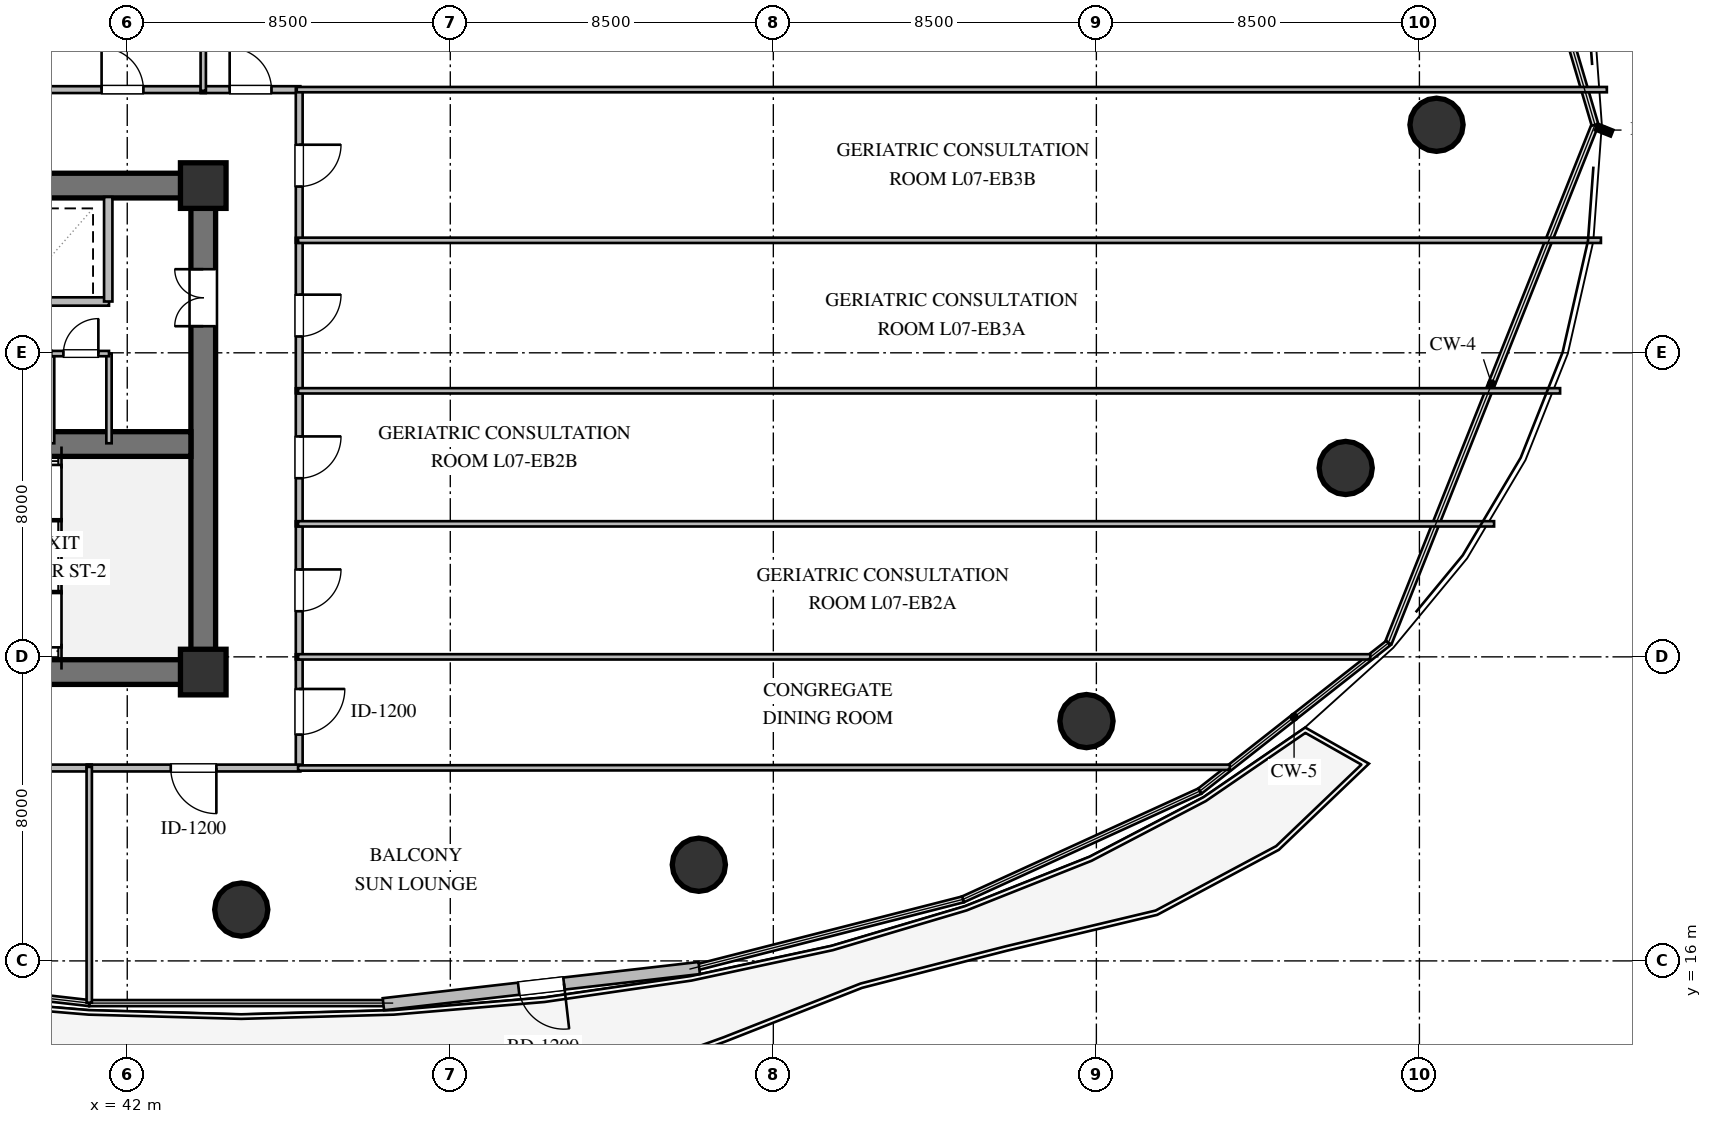
"""IFC4 building model, lengths in metres.
Left out: names, types, materials, properties, quantities, classifications, styles, units other than length and angle.
Written with IfcOpenShell. Run it as: python <this file> out.ifc"""

import sys

from ifc_helpers import new_model, si_unit, direction, frame, frame_2d, origin, origin_2d, place, context, subcontext, project, spatial, rectangle, circle, extrude, element, fill, save


model = new_model("IFC4")
c1 = context("Model", 3, precision=1e-05, world=origin(), true_north=direction((0.0, 1.0)))
c2 = subcontext(c1, "Body", "Model", "MODEL_VIEW")
j1 = project(units=[si_unit("LENGTHUNIT", "METRE"), si_unit("PLANEANGLEUNIT", "RADIAN")], contexts=[c1])
p1 = place(None, origin())
s1 = spatial("IfcSite", under=j1, at=p1, CompositionType="ELEMENT")
p2 = place(p1, origin())
s2 = spatial("IfcBuilding", under=s1, at=p2, CompositionType="ELEMENT")
p3 = place(p2, frame((0.0, 0.0, 31.2)))
s3 = spatial("IfcBuildingStorey", under=s2, at=p3, CompositionType="ELEMENT", Elevation=31.2)
for number, where, z_axis, x_axis in (
    (1, (21.675, 23.6, 0.0), (0.0, 0.0, 1.0), (1.0, 0.0, 0.0)),
    (2, (21.675, 36.4, 0.0), (0.0, 0.0, 1.0), (1.0, 0.0, 0.0)),
):
    element("IfcWall", number, at=place(p3, frame(where, z_axis=z_axis, x_axis=x_axis)), inside=s3, PredefinedType="SHEAR", context=c2, shape_type="SweptSolid", body=[
        extrude(rectangle(XDim=22.65, YDim=0.65, at=frame_2d((11.325, 0.0))), origin(), (0.0, 0.0, 1.0), 3.36),
    ])
p4 = place(p3, frame((44.0, 23.925, 0.0), z_axis=(0.0, 0.0, 1.0), x_axis=(0.0, 1.0, 0.0)))
e3 = element("IfcWall", 3, at=p4, inside=s3, PredefinedType="SHEAR", context=c2, shape_type="SweptSolid", body=[
    extrude(rectangle(XDim=12.15, YDim=0.65, at=frame_2d((6.075, 0.0))), origin(), (0.0, 0.0, 1.0), 3.36),
])
p5 = place(p4, frame((8.775, 0.0, 0.0)))
e4 = element("IfcOpeningElement", 4, at=p5, cuts=e3, PredefinedType="OPENING", context=c2, shape_type="SweptSolid", body=[
    extrude(rectangle(XDim=1.5, YDim=2.15, at=frame_2d((0.75, 1.075))), frame((0.0, 0.335, 0.0), z_axis=(0.0, -1.0, 0.0), x_axis=(1.0, 0.0, 0.0)), (0.0, 0.0, 1.0), 0.67),
])
p6 = place(p3, frame((22.325, 29.6, 0.0), z_axis=(0.0, 0.0, 1.0), x_axis=(1.0, 0.0, 0.0)))
e5 = element("IfcWall", 5, at=p6, inside=s3, PredefinedType="SHEAR", context=c2, shape_type="SweptSolid", body=[
    extrude(rectangle(XDim=21.35, YDim=0.65, at=frame_2d((10.675, 0.0))), origin(), (0.0, 0.0, 1.0), 3.36),
])
p7 = place(p6, frame((12.125, 0.0, 0.0)))
e6 = element("IfcOpeningElement", 6, at=p7, cuts=e5, PredefinedType="OPENING", context=c2, shape_type="SweptSolid", body=[
    extrude(rectangle(XDim=1.15, YDim=2.1, at=frame_2d((0.575, 1.05))), frame((0.0, 0.335, 0.0), z_axis=(0.0, -1.0, 0.0), x_axis=(1.0, 0.0, 0.0)), (0.0, 0.0, 1.0), 0.67),
])
for number, where, z_axis, x_axis in (
    (7, (44.0, 23.6, 0.0), (0.0, 0.0, 1.0), (1.0, 0.0, 0.0)),
    (8, (44.0, 36.4, 0.0), (0.0, 0.0, 1.0), (1.0, 0.0, 0.0)),
):
    element("IfcColumn", number, at=place(p3, frame(where, z_axis=z_axis, x_axis=x_axis)), inside=s3, PredefinedType="COLUMN", context=c2, shape_type="SweptSolid", body=[
        extrude(rectangle(XDim=1.2, YDim=1.2, at=origin_2d()), origin(), (0.0, 0.0, 1.0), 3.6),
    ])
for number, where, z_axis, x_axis in (
    (9, (76.45, 38.0, 0.0), (0.0, 0.0, 1.0), (1.0, 0.0, 0.0)),
    (10, (45.0, 17.35, 0.0), (0.0, 0.0, 1.0), (1.0, 0.0, 0.0)),
    (11, (57.04, 18.53, 0.0), (0.0, 0.0, 1.0), (1.0, 0.0, 0.0)),
    (12, (67.24, 22.31, 0.0), (0.0, 0.0, 1.0), (1.0, 0.0, 0.0)),
    (13, (74.06, 28.97, 0.0), (0.0, 0.0, 1.0), (1.0, 0.0, 0.0)),
):
    element("IfcColumn", number, at=place(p3, frame(where, z_axis=z_axis, x_axis=x_axis)), inside=s3, PredefinedType="COLUMN", context=c2, shape_type="SweptSolid", body=[
        extrude(circle(Radius=0.7, at=origin_2d()), origin(), (0.0, 0.0, 1.0), 3.6),
    ])
p8 = place(p3, frame((57.05, 15.812, 0.0), z_axis=(0.0, 0.0, 1.0), x_axis=(-0.993503192468, -0.113804246649, 0.0)))
e14 = element("IfcWall", 14, at=p8, inside=s3, PredefinedType="STANDARD", context=c2, shape_type="SweptSolid", body=[
    extrude(rectangle(XDim=8.365, YDim=0.32, at=frame_2d((4.182, 0.0))), origin(), (0.0, 0.0, 1.0), 3.36),
])
p9 = place(p8, frame((3.582, 0.0, 0.0)))
e15 = element("IfcOpeningElement", 15, at=p9, cuts=e14, PredefinedType="OPENING", context=c2, shape_type="SweptSolid", body=[
    extrude(rectangle(XDim=1.2, YDim=2.15, at=frame_2d((0.6, 1.075))), frame((0.0, 0.17, 0.0), z_axis=(0.0, -1.0, 0.0), x_axis=(1.0, 0.0, 0.0)), (0.0, 0.0, 1.0), 0.34),
])
p10 = place(p3, frame((33.98, 33.35, 0.0), z_axis=(0.0, 0.0, 1.0), x_axis=(1.0, 0.0, 0.0)))
e16 = element("IfcWall", 16, at=p10, inside=s3, PredefinedType="SOLIDWALL", context=c2, shape_type="SweptSolid", body=[
    extrude(rectangle(XDim=7.54, YDim=0.22, at=frame_2d((3.77, 0.0))), origin(), (0.0, 0.0, 1.0), 3.36),
])
p11 = place(p3, frame((41.5, 33.35, 0.0), z_axis=(0.0, 0.0, 1.0), x_axis=(0.0, 1.0, 0.0)))
e17 = element("IfcWall", 17, at=p11, inside=s3, PredefinedType="SOLIDWALL", context=c2, shape_type="SweptSolid", body=[
    extrude(rectangle(XDim=2.75, YDim=0.22, at=frame_2d((1.375, 0.0))), origin(), (0.0, 0.0, 1.0), 3.36),
])
p12 = place(p3, frame((40.0, 29.62, 0.0), z_axis=(0.0, 0.0, 1.0), x_axis=(0.0, 1.0, 0.0)))
e18 = element("IfcWall", 18, at=p12, inside=s3, PredefinedType="PLUMBINGWALL", context=c2, shape_type="SweptSolid", body=[
    extrude(rectangle(XDim=2.36, YDim=0.16, at=frame_2d((1.18, 0.0))), origin(), (0.0, 0.0, 1.0), 3.36),
])
p13 = place(p3, frame((41.52, 29.62, 0.0), z_axis=(0.0, 0.0, 1.0), x_axis=(0.0, 1.0, 0.0)))
e19 = element("IfcWall", 19, at=p13, inside=s3, PredefinedType="PARTITIONING", context=c2, shape_type="SweptSolid", body=[
    extrude(rectangle(XDim=2.36, YDim=0.14, at=frame_2d((1.18, 0.0))), origin(), (0.0, 0.0, 1.0), 3.36),
])
p14 = place(p3, frame((40.0, 31.98, 0.0), z_axis=(0.0, 0.0, 1.0), x_axis=(1.0, 0.0, 0.0)))
e20 = element("IfcWall", 20, at=p14, inside=s3, PredefinedType="PARTITIONING", context=c2, shape_type="SweptSolid", body=[
    extrude(rectangle(XDim=1.52, YDim=0.14, at=frame_2d((0.76, 0.0))), origin(), (0.0, 0.0, 1.0), 3.36),
])
p15 = place(p14, frame((0.32, 0.0, 0.0)))
e21 = element("IfcOpeningElement", 21, at=p15, cuts=e20, PredefinedType="OPENING", context=c2, shape_type="SweptSolid", body=[
    extrude(rectangle(XDim=0.92, YDim=2.1, at=frame_2d((0.46, 1.05))), frame((0.0, 0.08, 0.0), z_axis=(0.0, -1.0, 0.0), x_axis=(1.0, 0.0, 0.0)), (0.0, 0.0, 1.0), 0.16),
])
p16 = place(p3, frame((39.685, 38.925, 0.0), z_axis=(0.0, 0.0, 1.0), x_axis=(1.0, 0.0, 0.0)))
e22 = element("IfcWall", 22, at=p16, inside=s3, PredefinedType="PARTITIONING", context=c2, shape_type="SweptSolid", body=[
    extrude(rectangle(XDim=4.38, YDim=0.18, at=frame_2d((2.19, 0.0))), origin(), (0.0, 0.0, 1.0), 3.36),
])
p17 = place(p16, frame((1.64, 0.0, 0.0)))
e23 = element("IfcOpeningElement", 23, at=p17, cuts=e22, PredefinedType="OPENING", context=c2, shape_type="SweptSolid", body=[
    extrude(rectangle(XDim=1.1, YDim=2.1, at=frame_2d((0.55, 1.05))), frame((0.0, 0.1, 0.0), z_axis=(0.0, -1.0, 0.0), x_axis=(1.0, 0.0, 0.0)), (0.0, 0.0, 1.0), 0.2),
])
p18 = place(p3, frame((43.935, 38.925, 0.0), z_axis=(0.0, 0.0, 1.0), x_axis=(1.0, 0.0, 0.0)))
e24 = element("IfcWall", 24, at=p18, inside=s3, PredefinedType="PARTITIONING", context=c2, shape_type="SweptSolid", body=[
    extrude(rectangle(XDim=2.62, YDim=0.18, at=frame_2d((1.31, 0.0))), origin(), (0.0, 0.0, 1.0), 3.36),
])
p19 = place(p18, frame((0.76, 0.0, 0.0)))
e25 = element("IfcOpeningElement", 25, at=p19, cuts=e24, PredefinedType="OPENING", context=c2, shape_type="SweptSolid", body=[
    extrude(rectangle(XDim=1.1, YDim=2.1, at=frame_2d((0.55, 1.05))), frame((0.0, 0.1, 0.0), z_axis=(0.0, -1.0, 0.0), x_axis=(1.0, 0.0, 0.0)), (0.0, 0.0, 1.0), 0.2),
])
p20 = place(p3, frame((46.525, 24.065, 0.0), z_axis=(0.0, 0.0, 1.0), x_axis=(0.0, -1.0, 0.0)))
e26 = element("IfcWall", 26, at=p20, inside=s3, PredefinedType="PARTITIONING", context=c2, shape_type="SweptSolid", body=[
    extrude(rectangle(XDim=3.02, YDim=0.18, at=frame_2d((1.51, 0.0))), origin(), (0.0, 0.0, 1.0), 3.36),
])
p21 = place(p20, frame((0.91, 0.0, 0.0)))
e27 = element("IfcOpeningElement", 27, at=p21, cuts=e26, PredefinedType="OPENING", context=c2, shape_type="SweptSolid", body=[
    extrude(rectangle(XDim=1.2, YDim=2.15, at=frame_2d((0.6, 1.075))), frame((0.0, 0.1, 0.0), z_axis=(0.0, -1.0, 0.0), x_axis=(1.0, 0.0, 0.0)), (0.0, 0.0, 1.0), 0.2),
])
p22 = place(p3, frame((46.525, 27.565, 0.0), z_axis=(0.0, 0.0, 1.0), x_axis=(0.0, -1.0, 0.0)))
e28 = element("IfcWall", 28, at=p22, inside=s3, PredefinedType="PARTITIONING", context=c2, shape_type="SweptSolid", body=[
    extrude(rectangle(XDim=3.63, YDim=0.18, at=frame_2d((1.815, 0.0))), origin(), (0.0, 0.0, 1.0), 3.36),
])
p23 = place(p22, frame((1.265, 0.0, 0.0)))
e29 = element("IfcOpeningElement", 29, at=p23, cuts=e28, PredefinedType="OPENING", context=c2, shape_type="SweptSolid", body=[
    extrude(rectangle(XDim=1.1, YDim=2.1, at=frame_2d((0.55, 1.05))), frame((0.0, 0.1, 0.0), z_axis=(0.0, -1.0, 0.0), x_axis=(1.0, 0.0, 0.0)), (0.0, 0.0, 1.0), 0.2),
])
p24 = place(p3, frame((46.525, 31.065, 0.0), z_axis=(0.0, 0.0, 1.0), x_axis=(0.0, -1.0, 0.0)))
e30 = element("IfcWall", 30, at=p24, inside=s3, PredefinedType="PARTITIONING", context=c2, shape_type="SweptSolid", body=[
    extrude(rectangle(XDim=3.63, YDim=0.18, at=frame_2d((1.815, 0.0))), origin(), (0.0, 0.0, 1.0), 3.36),
])
p25 = place(p24, frame((1.265, 0.0, 0.0)))
e31 = element("IfcOpeningElement", 31, at=p25, cuts=e30, PredefinedType="OPENING", context=c2, shape_type="SweptSolid", body=[
    extrude(rectangle(XDim=1.1, YDim=2.1, at=frame_2d((0.55, 1.05))), frame((0.0, 0.1, 0.0), z_axis=(0.0, -1.0, 0.0), x_axis=(1.0, 0.0, 0.0)), (0.0, 0.0, 1.0), 0.2),
])
p26 = place(p3, frame((46.525, 35.025, 0.0), z_axis=(0.0, 0.0, 1.0), x_axis=(0.0, -1.0, 0.0)))
e32 = element("IfcWall", 32, at=p26, inside=s3, PredefinedType="PARTITIONING", context=c2, shape_type="SweptSolid", body=[
    extrude(rectangle(XDim=4.09, YDim=0.18, at=frame_2d((2.045, 0.0))), origin(), (0.0, 0.0, 1.0), 3.36),
])
p27 = place(p26, frame((1.495, 0.0, 0.0)))
e33 = element("IfcOpeningElement", 33, at=p27, cuts=e32, PredefinedType="OPENING", context=c2, shape_type="SweptSolid", body=[
    extrude(rectangle(XDim=1.1, YDim=2.1, at=frame_2d((0.55, 1.05))), frame((0.0, 0.1, 0.0), z_axis=(0.0, -1.0, 0.0), x_axis=(1.0, 0.0, 0.0)), (0.0, 0.0, 1.0), 0.2),
])
p28 = place(p3, frame((46.525, 38.955, 0.0), z_axis=(0.0, 0.0, 1.0), x_axis=(0.0, -1.0, 0.0)))
e34 = element("IfcWall", 34, at=p28, inside=s3, PredefinedType="PARTITIONING", context=c2, shape_type="SweptSolid", body=[
    extrude(rectangle(XDim=4.06, YDim=0.18, at=frame_2d((2.03, 0.0))), origin(), (0.0, 0.0, 1.0), 3.36),
])
p29 = place(p28, frame((1.48, 0.0, 0.0)))
e35 = element("IfcOpeningElement", 35, at=p29, cuts=e34, PredefinedType="OPENING", context=c2, shape_type="SweptSolid", body=[
    extrude(rectangle(XDim=1.1, YDim=2.1, at=frame_2d((0.55, 1.05))), frame((0.0, 0.1, 0.0), z_axis=(0.0, -1.0, 0.0), x_axis=(1.0, 0.0, 0.0)), (0.0, 0.0, 1.0), 0.2),
])
p30 = place(p3, frame((41.065, 21.075, 0.0), z_axis=(0.0, 0.0, 1.0), x_axis=(-1.0, 0.0, 0.0)))
e36 = element("IfcWall", 36, at=p30, inside=s3, PredefinedType="PARTITIONING", context=c2, shape_type="SweptSolid", body=[
    extrude(rectangle(XDim=7.13, YDim=0.18, at=frame_2d((3.565, 0.0))), origin(), (0.0, 0.0, 1.0), 2.996),
])
p31 = place(p30, frame((3.015, 0.0, 0.0)))
e37 = element("IfcOpeningElement", 37, at=p31, cuts=e36, PredefinedType="OPENING", context=c2, shape_type="SweptSolid", body=[
    extrude(rectangle(XDim=1.1, YDim=2.1, at=frame_2d((0.55, 1.05))), frame((0.0, 0.1, 0.0), z_axis=(0.0, -1.0, 0.0), x_axis=(1.0, 0.0, 0.0)), (0.0, 0.0, 1.0), 0.2),
])
p32 = place(p3, frame((46.555, 21.075, 0.0), z_axis=(0.0, 0.0, 1.0), x_axis=(-1.0, 0.0, 0.0)))
e38 = element("IfcWall", 38, at=p32, inside=s3, PredefinedType="PARTITIONING", context=c2, shape_type="SweptSolid", body=[
    extrude(rectangle(XDim=5.62, YDim=0.18, at=frame_2d((2.81, 0.0))), origin(), (0.0, 0.0, 1.0), 3.36),
])
p33 = place(p32, frame((2.21, 0.0, 0.0)))
e39 = element("IfcOpeningElement", 39, at=p33, cuts=e38, PredefinedType="OPENING", context=c2, shape_type="SweptSolid", body=[
    extrude(rectangle(XDim=1.2, YDim=2.15, at=frame_2d((0.6, 1.075))), frame((0.0, 0.1, 0.0), z_axis=(0.0, -1.0, 0.0), x_axis=(1.0, 0.0, 0.0)), (0.0, 0.0, 1.0), 0.2),
])
p34 = place(p3, frame((44.0, 67.706, 0.0), z_axis=(0.0, 0.0, 1.0), x_axis=(0.0, -1.0, 0.0)))
e40 = element("IfcWall", 40, at=p34, inside=s3, PredefinedType="PARTITIONING", context=c2, shape_type="SweptSolid", body=[
    extrude(rectangle(XDim=28.811, YDim=0.14, at=frame_2d((14.406, 0.0))), origin(), (0.0, 0.0, 1.0), 2.89),
])
p35 = place(p3, frame((80.932, 38.925, 0.0), z_axis=(0.0, 0.0, 1.0), x_axis=(-1.0, 0.0, 0.0)))
e41 = element("IfcWall", 41, at=p35, inside=s3, PredefinedType="PARTITIONING", context=c2, shape_type="SweptSolid", body=[
    extrude(rectangle(XDim=34.472, YDim=0.14, at=frame_2d((17.236, 0.0))), origin(), (0.0, 0.0, 1.0), 3.36),
])
p36 = place(p3, frame((46.495, 24.0, 0.0), z_axis=(0.0, 0.0, 1.0), x_axis=(1.0, 0.0, 0.0)))
e42 = element("IfcWall", 42, at=p36, inside=s3, PredefinedType="PARTITIONING", context=c2, shape_type="SweptSolid", body=[
    extrude(rectangle(XDim=28.214, YDim=0.14, at=frame_2d((14.107, 0.0))), origin(), (0.0, 0.0, 1.0), 2.89),
])
p37 = place(p3, frame((71.011, 21.094, 0.0), z_axis=(0.0, 0.0, 1.0), x_axis=(-0.999999682646, -0.000796685534, 0.0)))
e43 = element("IfcWall", 43, at=p37, inside=s3, PredefinedType="PARTITIONING", context=c2, shape_type="SweptSolid", body=[
    extrude(rectangle(XDim=24.516, YDim=0.14, at=frame_2d((12.258, 0.0))), origin(), (0.0, 0.0, 1.0), 2.996),
])
p38 = place(p3, frame((46.495, 27.5, 0.0), z_axis=(0.0, 0.0, 1.0), x_axis=(1.0, 0.0, 0.0)))
e44 = element("IfcWall", 44, at=p38, inside=s3, PredefinedType="PARTITIONING", context=c2, shape_type="SweptSolid", body=[
    extrude(rectangle(XDim=31.47, YDim=0.14, at=frame_2d((15.735, 0.0))), origin(), (0.0, 0.0, 1.0), 2.89),
])
p39 = place(p3, frame((46.495, 31.0, 0.0), z_axis=(0.0, 0.0, 1.0), x_axis=(1.0, 0.0, 0.0)))
e45 = element("IfcWall", 45, at=p39, inside=s3, PredefinedType="PARTITIONING", context=c2, shape_type="SweptSolid", body=[
    extrude(rectangle(XDim=33.207, YDim=0.14, at=frame_2d((16.604, 0.0))), origin(), (0.0, 0.0, 1.0), 3.36),
])
p40 = place(p3, frame((46.495, 34.96, 0.0), z_axis=(0.0, 0.0, 1.0), x_axis=(1.0, 0.0, 0.0)))
e46 = element("IfcWall", 46, at=p40, inside=s3, PredefinedType="PARTITIONING", context=c2, shape_type="SweptSolid", body=[
    extrude(rectangle(XDim=34.281, YDim=0.14, at=frame_2d((17.14, 0.0))), origin(), (0.0, 0.0, 1.0), 3.36),
])
p41 = place(p3, frame((41.0, 21.105, 0.0), z_axis=(0.0, 0.0, 1.0), x_axis=(0.0, -1.0, 0.0)))
e47 = element("IfcWall", 47, at=p41, inside=s3, PredefinedType="PARTITIONING", context=c2, shape_type="SweptSolid", body=[
    extrude(rectangle(XDim=6.205, YDim=0.14, at=frame_2d((3.103, 0.0))), origin(), (0.0, 0.0, 1.0), 3.36),
])
p42 = place(p9, origin())
e48 = element("IfcDoor", 48, at=p42, inside=s3, OperationType="SINGLE_SWING_LEFT", PredefinedType="DOOR", context=c2, shape_type="SweptSolid", body=[
    extrude(rectangle(XDim=1.2, YDim=2.15, at=frame_2d((0.6, 1.075))), frame((0.0, 0.025, 0.0), z_axis=(0.0, -1.0, 0.0), x_axis=(1.0, 0.0, 0.0)), (0.0, 0.0, 1.0), 0.05),
])
fill(e15, e48)
p43 = place(p5, origin())
e49 = element("IfcDoor", 49, at=p43, inside=s3, OperationType="DOUBLE_DOOR_SINGLE_SWING", PredefinedType="DOOR", context=c2, shape_type="SweptSolid", body=[
    extrude(rectangle(XDim=1.5, YDim=2.15, at=frame_2d((0.75, 1.075))), frame((0.0, 0.025, 0.0), z_axis=(0.0, -1.0, 0.0), x_axis=(1.0, 0.0, 0.0)), (0.0, 0.0, 1.0), 0.05),
])
fill(e4, e49)
p44 = place(p15, origin())
e50 = element("IfcDoor", 50, at=p44, inside=s3, OperationType="SINGLE_SWING_RIGHT", PredefinedType="DOOR", context=c2, shape_type="SweptSolid", body=[
    extrude(rectangle(XDim=0.92, YDim=2.1, at=frame_2d((0.46, 1.05))), frame((0.0, 0.025, 0.0), z_axis=(0.0, -1.0, 0.0), x_axis=(1.0, 0.0, 0.0)), (0.0, 0.0, 1.0), 0.05),
])
fill(e21, e50)
p45 = place(p17, origin())
e51 = element("IfcDoor", 51, at=p45, inside=s3, OperationType="SINGLE_SWING_LEFT", PredefinedType="DOOR", context=c2, shape_type="SweptSolid", body=[
    extrude(rectangle(XDim=1.1, YDim=2.1, at=frame_2d((0.55, 1.05))), frame((0.0, 0.025, 0.0), z_axis=(0.0, -1.0, 0.0), x_axis=(1.0, 0.0, 0.0)), (0.0, 0.0, 1.0), 0.05),
])
fill(e23, e51)
p46 = place(p19, origin())
e52 = element("IfcDoor", 52, at=p46, inside=s3, OperationType="SINGLE_SWING_LEFT", PredefinedType="DOOR", context=c2, shape_type="SweptSolid", body=[
    extrude(rectangle(XDim=1.1, YDim=2.1, at=frame_2d((0.55, 1.05))), frame((0.0, 0.025, 0.0), z_axis=(0.0, -1.0, 0.0), x_axis=(1.0, 0.0, 0.0)), (0.0, 0.0, 1.0), 0.05),
])
fill(e25, e52)
p47 = place(p21, origin())
e53 = element("IfcDoor", 53, at=p47, inside=s3, OperationType="SINGLE_SWING_LEFT", PredefinedType="DOOR", context=c2, shape_type="SweptSolid", body=[
    extrude(rectangle(XDim=1.2, YDim=2.15, at=frame_2d((0.6, 1.075))), frame((0.0, 0.025, 0.0), z_axis=(0.0, -1.0, 0.0), x_axis=(1.0, 0.0, 0.0)), (0.0, 0.0, 1.0), 0.05),
])
fill(e27, e53)
p48 = place(p23, origin())
e54 = element("IfcDoor", 54, at=p48, inside=s3, OperationType="SINGLE_SWING_LEFT", PredefinedType="DOOR", context=c2, shape_type="SweptSolid", body=[
    extrude(rectangle(XDim=1.1, YDim=2.1, at=frame_2d((0.55, 1.05))), frame((0.0, 0.025, 0.0), z_axis=(0.0, -1.0, 0.0), x_axis=(1.0, 0.0, 0.0)), (0.0, 0.0, 1.0), 0.05),
])
fill(e29, e54)
p49 = place(p25, origin())
e55 = element("IfcDoor", 55, at=p49, inside=s3, OperationType="SINGLE_SWING_LEFT", PredefinedType="DOOR", context=c2, shape_type="SweptSolid", body=[
    extrude(rectangle(XDim=1.1, YDim=2.1, at=frame_2d((0.55, 1.05))), frame((0.0, 0.025, 0.0), z_axis=(0.0, -1.0, 0.0), x_axis=(1.0, 0.0, 0.0)), (0.0, 0.0, 1.0), 0.05),
])
fill(e31, e55)
p50 = place(p27, origin())
e56 = element("IfcDoor", 56, at=p50, inside=s3, OperationType="SINGLE_SWING_LEFT", PredefinedType="DOOR", context=c2, shape_type="SweptSolid", body=[
    extrude(rectangle(XDim=1.1, YDim=2.1, at=frame_2d((0.55, 1.05))), frame((0.0, 0.025, 0.0), z_axis=(0.0, -1.0, 0.0), x_axis=(1.0, 0.0, 0.0)), (0.0, 0.0, 1.0), 0.05),
])
fill(e33, e56)
p51 = place(p29, origin())
e57 = element("IfcDoor", 57, at=p51, inside=s3, OperationType="SINGLE_SWING_LEFT", PredefinedType="DOOR", context=c2, shape_type="SweptSolid", body=[
    extrude(rectangle(XDim=1.1, YDim=2.1, at=frame_2d((0.55, 1.05))), frame((0.0, 0.025, 0.0), z_axis=(0.0, -1.0, 0.0), x_axis=(1.0, 0.0, 0.0)), (0.0, 0.0, 1.0), 0.05),
])
fill(e35, e57)
p52 = place(p33, origin())
e58 = element("IfcDoor", 58, at=p52, inside=s3, OperationType="SINGLE_SWING_LEFT", PredefinedType="DOOR", context=c2, shape_type="SweptSolid", body=[
    extrude(rectangle(XDim=1.2, YDim=2.15, at=frame_2d((0.6, 1.075))), frame((0.0, 0.025, 0.0), z_axis=(0.0, -1.0, 0.0), x_axis=(1.0, 0.0, 0.0)), (0.0, 0.0, 1.0), 0.05),
])
fill(e39, e58)
save(model, sys.argv[1])
